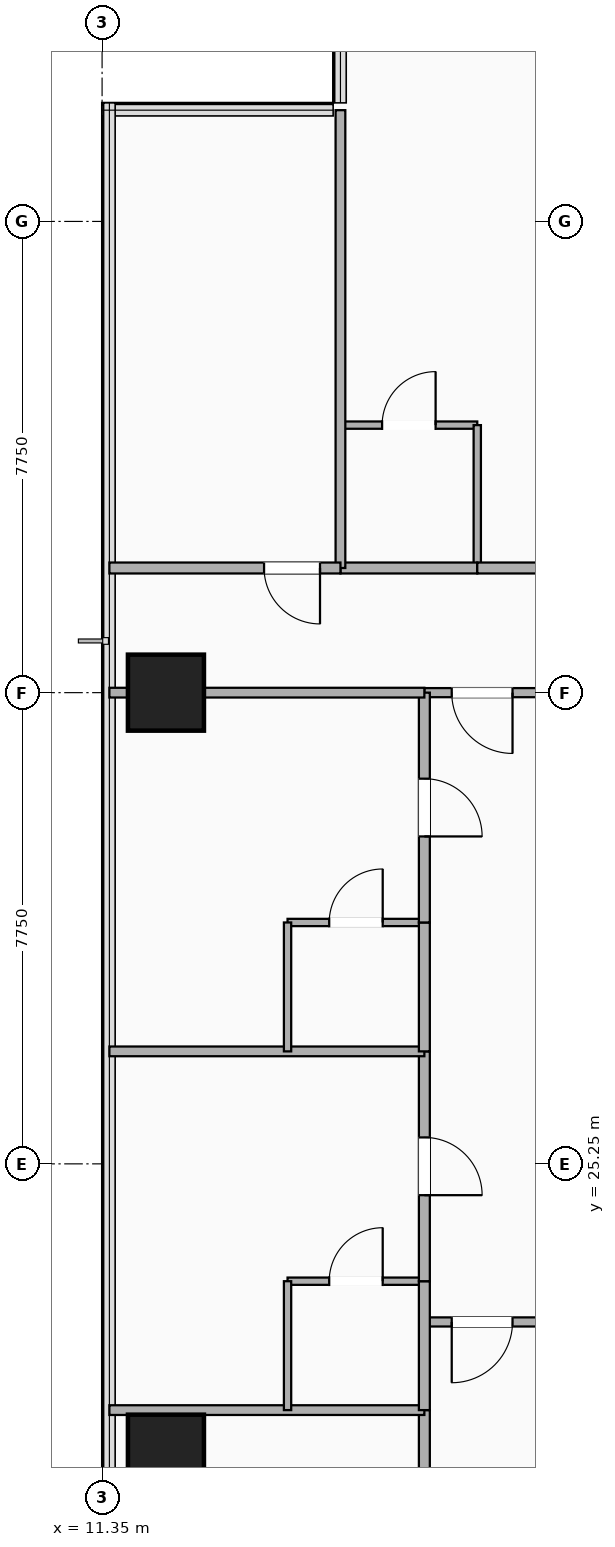
"""IFC4 building model, lengths in metres.
Left out: names, types, materials, properties, quantities, classifications, styles, units other than length and angle.
Written with IfcOpenShell. Run it as: python <this file> out.ifc"""

import sys

from ifc_helpers import new_model, si_unit, direction, frame, frame_2d, origin, origin_2d, place, context, subcontext, project, spatial, rectangle, extrude, element, fill, save


model = new_model("IFC4")
c1 = context("Model", 3, precision=1e-05, world=origin(), true_north=direction((0.0, 1.0)))
c2 = subcontext(c1, "Body", "Model", "MODEL_VIEW")
j1 = project(units=[si_unit("LENGTHUNIT", "METRE"), si_unit("PLANEANGLEUNIT", "RADIAN")], contexts=[c1])
p1 = place(None, origin())
s1 = spatial("IfcSite", under=j1, at=p1, CompositionType="ELEMENT")
p2 = place(p1, origin())
s2 = spatial("IfcBuilding", under=s1, at=p2, CompositionType="ELEMENT")
p3 = place(p2, frame((0.0, 0.0, 98.7)))
s3 = spatial("IfcBuildingStorey", under=s2, at=p3, CompositionType="ELEMENT", Elevation=98.7)
for number, where, z_axis, x_axis in (
    (1, (12.4, 20.5, -0.26), (0.0, 0.0, 1.0), (1.0, 0.0, 0.0)),
    (2, (12.4, 33.0, -0.26), (0.0, 0.0, 1.0), (1.0, 0.0, 0.0)),
):
    element("IfcColumn", number, at=place(p3, frame(where, z_axis=z_axis, x_axis=x_axis)), inside=s3, PredefinedType="COLUMN", context=c2, shape_type="SweptSolid", body=[
        extrude(rectangle(XDim=1.25, YDim=1.25, at=origin_2d()), origin(), (0.0, 0.0, 1.0), 3.5),
    ])
p4 = place(p3, frame((16.65, 22.65, 0.0), z_axis=(0.0, 0.0, 1.0), x_axis=(1.0, 0.0, 0.0)))
e3 = element("IfcWall", 3, at=p4, inside=s3, PredefinedType="PARTITIONING", context=c2, shape_type="SweptSolid", body=[
    extrude(rectangle(XDim=2.0, YDim=0.15, at=frame_2d((1.0, 0.0))), origin(), (0.0, 0.0, 1.0), 3.24),
])
p5 = place(p4, frame((0.45, 0.0, 0.0)))
e4 = element("IfcOpeningElement", 4, at=p5, cuts=e3, PredefinedType="OPENING", context=c2, shape_type="SweptSolid", body=[
    extrude(rectangle(XDim=1.0, YDim=2.15, at=frame_2d((0.5, 1.075))), frame((0.0, 0.085, 0.0), z_axis=(0.0, -1.0, 0.0), x_axis=(1.0, 0.0, 0.0)), (0.0, 0.0, 1.0), 0.17),
])
p6 = place(p3, frame((16.65, 33.0, 0.0), z_axis=(0.0, 0.0, 1.0), x_axis=(1.0, 0.0, 0.0)))
e5 = element("IfcWall", 5, at=p6, inside=s3, PredefinedType="PARTITIONING", context=c2, shape_type="SweptSolid", body=[
    extrude(rectangle(XDim=2.0, YDim=0.15, at=frame_2d((1.0, 0.0))), origin(), (0.0, 0.0, 1.0), 2.313),
])
p7 = place(p6, frame((0.45, 0.0, 0.0)))
e6 = element("IfcOpeningElement", 6, at=p7, cuts=e5, PredefinedType="OPENING", context=c2, shape_type="SweptSolid", body=[
    extrude(rectangle(XDim=1.0, YDim=2.15, at=frame_2d((0.5, 1.075))), frame((0.0, 0.085, 0.0), z_axis=(0.0, -1.0, 0.0), x_axis=(1.0, 0.0, 0.0)), (0.0, 0.0, 1.0), 0.17),
])
p8 = place(p3, frame((15.27, 37.4, 0.0), z_axis=(0.0, 0.0, 1.0), x_axis=(1.0, 0.0, 0.0)))
e7 = element("IfcWall", 7, at=p8, inside=s3, PredefinedType="PARTITIONING", context=c2, shape_type="SweptSolid", body=[
    extrude(rectangle(XDim=2.25, YDim=0.12, at=frame_2d((1.125, 0.0))), origin(), (0.0, 0.0, 1.0), 3.24),
])
p9 = place(p8, frame((1.565, 0.0, 0.0), z_axis=(0.0, 0.0, 1.0), x_axis=(-1.0, 0.0, 0.0)))
e8 = element("IfcOpeningElement", 8, at=p9, cuts=e7, PredefinedType="OPENING", context=c2, shape_type="SweptSolid", body=[
    extrude(rectangle(XDim=0.88, YDim=2.08, at=frame_2d((0.44, 1.04))), frame((0.0, 0.07, 0.0), z_axis=(0.0, -1.0, 0.0), x_axis=(1.0, 0.0, 0.0)), (0.0, 0.0, 1.0), 0.14),
])
p10 = place(p3, frame((17.52, 35.05, 0.0), z_axis=(0.0, 0.0, 1.0), x_axis=(0.0, 1.0, 0.0)))
e9 = element("IfcWall", 9, at=p10, inside=s3, PredefinedType="PARTITIONING", context=c2, shape_type="SweptSolid", body=[
    extrude(rectangle(XDim=2.35, YDim=0.12, at=frame_2d((1.175, 0.0))), origin(), (0.0, 0.0, 1.0), 3.24),
])
p11 = place(p3, frame((15.27, 35.05, 0.0), z_axis=(0.0, 0.0, 1.0), x_axis=(1.0, 0.0, 0.0)))
e10 = element("IfcWall", 10, at=p11, inside=s3, PredefinedType="PARTITIONING", context=c2, shape_type="SweptSolid", body=[
    extrude(rectangle(XDim=2.25, YDim=0.18, at=frame_2d((1.125, 0.0))), origin(), (0.0, 0.0, 1.0), 3.24),
])
p12 = place(p3, frame((17.52, 35.05, 0.0), z_axis=(0.0, 0.0, 1.0), x_axis=(1.0, 0.0, 0.0)))
e11 = element("IfcWall", 11, at=p12, inside=s3, PredefinedType="PARTITIONING", context=c2, shape_type="SweptSolid", body=[
    extrude(rectangle(XDim=7.581, YDim=0.18, at=frame_2d((3.79, 0.0))), origin(), (0.0, 0.0, 1.0), 2.313),
])
p13 = place(p12, frame((3.315, 0.0, 0.0)))
e12 = element("IfcOpeningElement", 12, at=p13, cuts=e11, PredefinedType="OPENING", context=c2, shape_type="SweptSolid", body=[
    extrude(rectangle(XDim=0.95, YDim=2.15, at=frame_2d((0.475, 1.075))), frame((0.0, 0.1, 0.0), z_axis=(0.0, -1.0, 0.0), x_axis=(1.0, 0.0, 0.0)), (0.0, 0.0, 1.0), 0.2),
])
p14 = place(p3, frame((15.27, 35.05, 0.0), z_axis=(0.0, 0.0, 1.0), x_axis=(0.0, 1.0, 0.0)))
e13 = element("IfcWall", 13, at=p14, inside=s3, PredefinedType="PARTITIONING", context=c2, shape_type="SweptSolid", body=[
    extrude(rectangle(XDim=7.53, YDim=0.16, at=frame_2d((3.765, 0.0))), origin(), (0.0, 0.0, 1.0), 3.24),
])
p15 = place(p3, frame((16.65, 17.42, 0.0), z_axis=(0.0, 0.0, 1.0), x_axis=(0.0, 1.0, 0.0)))
e14 = element("IfcWall", 14, at=p15, inside=s3, PredefinedType="PARTITIONING", context=c2, shape_type="SweptSolid", body=[
    extrude(rectangle(XDim=3.78, YDim=0.18, at=frame_2d((1.89, 0.0))), origin(), (0.0, 0.0, 1.0), 2.313),
])
p16 = place(p15, frame((1.415, 0.0, 0.0)))
e15 = element("IfcOpeningElement", 15, at=p16, cuts=e14, PredefinedType="OPENING", context=c2, shape_type="SweptSolid", body=[
    extrude(rectangle(XDim=0.95, YDim=2.15, at=frame_2d((0.475, 1.075))), frame((0.0, 0.1, 0.0), z_axis=(0.0, -1.0, 0.0), x_axis=(1.0, 0.0, 0.0)), (0.0, 0.0, 1.0), 0.2),
])
p17 = place(p3, frame((11.47, 21.2, 0.0), z_axis=(0.0, 0.0, 1.0), x_axis=(1.0, 0.0, 0.0)))
e16 = element("IfcWall", 16, at=p17, inside=s3, PredefinedType="PARTITIONING", context=c2, shape_type="SweptSolid", body=[
    extrude(rectangle(XDim=5.18, YDim=0.16, at=frame_2d((2.59, 0.0))), origin(), (0.0, 0.0, 1.0), 2.603),
])
p18 = place(p3, frame((14.4, 23.32, 0.0), z_axis=(0.0, 0.0, 1.0), x_axis=(1.0, 0.0, 0.0)))
e17 = element("IfcWall", 17, at=p18, inside=s3, PredefinedType="PARTITIONING", context=c2, shape_type="SweptSolid", body=[
    extrude(rectangle(XDim=2.25, YDim=0.12, at=frame_2d((1.125, 0.0))), origin(), (0.0, 0.0, 1.0), 3.24),
])
p19 = place(p18, frame((1.565, 0.0, 0.0), z_axis=(0.0, 0.0, 1.0), x_axis=(-1.0, 0.0, 0.0)))
e18 = element("IfcOpeningElement", 18, at=p19, cuts=e17, PredefinedType="OPENING", context=c2, shape_type="SweptSolid", body=[
    extrude(rectangle(XDim=0.88, YDim=2.08, at=frame_2d((0.44, 1.04))), frame((0.0, 0.07, 0.0), z_axis=(0.0, -1.0, 0.0), x_axis=(1.0, 0.0, 0.0)), (0.0, 0.0, 1.0), 0.14),
])
p20 = place(p3, frame((14.4, 21.2, 0.0), z_axis=(0.0, 0.0, 1.0), x_axis=(0.0, 1.0, 0.0)))
e19 = element("IfcWall", 19, at=p20, inside=s3, PredefinedType="PARTITIONING", context=c2, shape_type="SweptSolid", body=[
    extrude(rectangle(XDim=2.12, YDim=0.12, at=frame_2d((1.06, 0.0))), origin(), (0.0, 0.0, 1.0), 3.24),
])
p21 = place(p3, frame((16.65, 21.2, 0.0), z_axis=(0.0, 0.0, 1.0), x_axis=(0.0, 1.0, 0.0)))
e20 = element("IfcWall", 20, at=p21, inside=s3, PredefinedType="PARTITIONING", context=c2, shape_type="SweptSolid", body=[
    extrude(rectangle(XDim=2.12, YDim=0.18, at=frame_2d((1.06, 0.0))), origin(), (0.0, 0.0, 1.0), 3.24),
])
p22 = place(p3, frame((16.65, 23.32, 0.0), z_axis=(0.0, 0.0, 1.0), x_axis=(0.0, 1.0, 0.0)))
e21 = element("IfcWall", 21, at=p22, inside=s3, PredefinedType="PARTITIONING", context=c2, shape_type="SweptSolid", body=[
    extrude(rectangle(XDim=3.78, YDim=0.18, at=frame_2d((1.89, 0.0))), origin(), (0.0, 0.0, 1.0), 2.818),
])
p23 = place(p22, frame((1.415, 0.0, 0.0)))
e22 = element("IfcOpeningElement", 22, at=p23, cuts=e21, PredefinedType="OPENING", context=c2, shape_type="SweptSolid", body=[
    extrude(rectangle(XDim=0.95, YDim=2.15, at=frame_2d((0.475, 1.075))), frame((0.0, 0.1, 0.0), z_axis=(0.0, -1.0, 0.0), x_axis=(1.0, 0.0, 0.0)), (0.0, 0.0, 1.0), 0.2),
])
p24 = place(p3, frame((11.47, 27.1, 0.0), z_axis=(0.0, 0.0, 1.0), x_axis=(1.0, 0.0, 0.0)))
e23 = element("IfcWall", 23, at=p24, inside=s3, PredefinedType="PARTITIONING", context=c2, shape_type="SweptSolid", body=[
    extrude(rectangle(XDim=5.18, YDim=0.16, at=frame_2d((2.59, 0.0))), origin(), (0.0, 0.0, 1.0), 2.603),
])
p25 = place(p3, frame((14.4, 29.22, 0.0), z_axis=(0.0, 0.0, 1.0), x_axis=(1.0, 0.0, 0.0)))
e24 = element("IfcWall", 24, at=p25, inside=s3, PredefinedType="PARTITIONING", context=c2, shape_type="SweptSolid", body=[
    extrude(rectangle(XDim=2.25, YDim=0.12, at=frame_2d((1.125, 0.0))), origin(), (0.0, 0.0, 1.0), 3.24),
])
p26 = place(p25, frame((1.565, 0.0, 0.0), z_axis=(0.0, 0.0, 1.0), x_axis=(-1.0, 0.0, 0.0)))
e25 = element("IfcOpeningElement", 25, at=p26, cuts=e24, PredefinedType="OPENING", context=c2, shape_type="SweptSolid", body=[
    extrude(rectangle(XDim=0.88, YDim=2.08, at=frame_2d((0.44, 1.04))), frame((0.0, 0.07, 0.0), z_axis=(0.0, -1.0, 0.0), x_axis=(1.0, 0.0, 0.0)), (0.0, 0.0, 1.0), 0.14),
])
p27 = place(p3, frame((14.4, 27.1, 0.0), z_axis=(0.0, 0.0, 1.0), x_axis=(0.0, 1.0, 0.0)))
e26 = element("IfcWall", 26, at=p27, inside=s3, PredefinedType="PARTITIONING", context=c2, shape_type="SweptSolid", body=[
    extrude(rectangle(XDim=2.12, YDim=0.12, at=frame_2d((1.06, 0.0))), origin(), (0.0, 0.0, 1.0), 2.818),
])
p28 = place(p3, frame((16.65, 27.1, 0.0), z_axis=(0.0, 0.0, 1.0), x_axis=(0.0, 1.0, 0.0)))
e27 = element("IfcWall", 27, at=p28, inside=s3, PredefinedType="PARTITIONING", context=c2, shape_type="SweptSolid", body=[
    extrude(rectangle(XDim=2.12, YDim=0.18, at=frame_2d((1.06, 0.0))), origin(), (0.0, 0.0, 1.0), 2.818),
])
p29 = place(p3, frame((16.65, 29.22, 0.0), z_axis=(0.0, 0.0, 1.0), x_axis=(0.0, 1.0, 0.0)))
e28 = element("IfcWall", 28, at=p29, inside=s3, PredefinedType="PARTITIONING", context=c2, shape_type="SweptSolid", body=[
    extrude(rectangle(XDim=3.78, YDim=0.18, at=frame_2d((1.89, 0.0))), origin(), (0.0, 0.0, 1.0), 2.313),
])
p30 = place(p29, frame((1.415, 0.0, 0.0)))
e29 = element("IfcOpeningElement", 29, at=p30, cuts=e28, PredefinedType="OPENING", context=c2, shape_type="SweptSolid", body=[
    extrude(rectangle(XDim=0.95, YDim=2.15, at=frame_2d((0.475, 1.075))), frame((0.0, 0.1, 0.0), z_axis=(0.0, -1.0, 0.0), x_axis=(1.0, 0.0, 0.0)), (0.0, 0.0, 1.0), 0.2),
])
p31 = place(p3, frame((11.47, 33.0, 0.0), z_axis=(0.0, 0.0, 1.0), x_axis=(1.0, 0.0, 0.0)))
e30 = element("IfcWall", 30, at=p31, inside=s3, PredefinedType="PARTITIONING", context=c2, shape_type="SweptSolid", body=[
    extrude(rectangle(XDim=5.18, YDim=0.16, at=frame_2d((2.59, 0.0))), origin(), (0.0, 0.0, 1.0), 2.313),
])
p32 = place(p3, frame((11.47, 35.05, 0.0), z_axis=(0.0, 0.0, 1.0), x_axis=(1.0, 0.0, 0.0)))
e31 = element("IfcWall", 31, at=p32, inside=s3, PredefinedType="PARTITIONING", context=c2, shape_type="SweptSolid", body=[
    extrude(rectangle(XDim=3.8, YDim=0.18, at=frame_2d((1.9, 0.0))), origin(), (0.0, 0.0, 1.0), 3.24),
])
p33 = place(p32, frame((2.544, 0.0, 0.0)))
e32 = element("IfcOpeningElement", 32, at=p33, cuts=e31, PredefinedType="OPENING", context=c2, shape_type="SweptSolid", body=[
    extrude(rectangle(XDim=0.92, YDim=2.08, at=frame_2d((0.46, 1.04))), frame((0.0, 0.1, 0.0), z_axis=(0.0, -1.0, 0.0), x_axis=(1.0, 0.0, 0.0)), (0.0, 0.0, 1.0), 0.2),
])
p34 = place(p5, origin())
e33 = element("IfcDoor", 33, at=p34, inside=s3, OperationType="SINGLE_SWING_LEFT", PredefinedType="DOOR", context=c2, shape_type="SweptSolid", body=[
    extrude(rectangle(XDim=1.0, YDim=2.15, at=frame_2d((0.5, 1.075))), frame((0.0, 0.025, 0.0), z_axis=(0.0, -1.0, 0.0), x_axis=(1.0, 0.0, 0.0)), (0.0, 0.0, 1.0), 0.05),
])
fill(e4, e33)
p35 = place(p7, origin())
e34 = element("IfcDoor", 34, at=p35, inside=s3, OperationType="SINGLE_SWING_RIGHT", PredefinedType="DOOR", context=c2, shape_type="SweptSolid", body=[
    extrude(rectangle(XDim=1.0, YDim=2.15, at=frame_2d((0.5, 1.075))), frame((0.0, 0.025, 0.0), z_axis=(0.0, -1.0, 0.0), x_axis=(1.0, 0.0, 0.0)), (0.0, 0.0, 1.0), 0.05),
])
fill(e6, e34)
p36 = place(p9, origin())
e35 = element("IfcDoor", 35, at=p36, inside=s3, OperationType="SINGLE_SWING_RIGHT", PredefinedType="DOOR", context=c2, shape_type="SweptSolid", body=[
    extrude(rectangle(XDim=0.88, YDim=2.08, at=frame_2d((0.44, 1.04))), frame((0.0, 0.025, 0.0), z_axis=(0.0, -1.0, 0.0), x_axis=(1.0, 0.0, 0.0)), (0.0, 0.0, 1.0), 0.05),
])
fill(e8, e35)
p37 = place(p19, origin())
e36 = element("IfcDoor", 36, at=p37, inside=s3, OperationType="SINGLE_SWING_RIGHT", PredefinedType="DOOR", context=c2, shape_type="SweptSolid", body=[
    extrude(rectangle(XDim=0.88, YDim=2.08, at=frame_2d((0.44, 1.04))), frame((0.0, 0.025, 0.0), z_axis=(0.0, -1.0, 0.0), x_axis=(1.0, 0.0, 0.0)), (0.0, 0.0, 1.0), 0.05),
])
fill(e18, e36)
p38 = place(p23, origin())
e37 = element("IfcDoor", 37, at=p38, inside=s3, OperationType="SINGLE_SWING_LEFT", PredefinedType="DOOR", context=c2, shape_type="SweptSolid", body=[
    extrude(rectangle(XDim=0.95, YDim=2.15, at=frame_2d((0.475, 1.075))), frame((0.0, 0.025, 0.0), z_axis=(0.0, -1.0, 0.0), x_axis=(1.0, 0.0, 0.0)), (0.0, 0.0, 1.0), 0.05),
])
fill(e22, e37)
p39 = place(p26, origin())
e38 = element("IfcDoor", 38, at=p39, inside=s3, OperationType="SINGLE_SWING_RIGHT", PredefinedType="DOOR", context=c2, shape_type="SweptSolid", body=[
    extrude(rectangle(XDim=0.88, YDim=2.08, at=frame_2d((0.44, 1.04))), frame((0.0, 0.025, 0.0), z_axis=(0.0, -1.0, 0.0), x_axis=(1.0, 0.0, 0.0)), (0.0, 0.0, 1.0), 0.05),
])
fill(e25, e38)
p40 = place(p30, origin())
e39 = element("IfcDoor", 39, at=p40, inside=s3, OperationType="SINGLE_SWING_LEFT", PredefinedType="DOOR", context=c2, shape_type="SweptSolid", body=[
    extrude(rectangle(XDim=0.95, YDim=2.15, at=frame_2d((0.475, 1.075))), frame((0.0, 0.025, 0.0), z_axis=(0.0, -1.0, 0.0), x_axis=(1.0, 0.0, 0.0)), (0.0, 0.0, 1.0), 0.05),
])
fill(e29, e39)
p41 = place(p33, origin())
e40 = element("IfcDoor", 40, at=p41, inside=s3, OperationType="SINGLE_SWING_RIGHT", PredefinedType="DOOR", context=c2, shape_type="SweptSolid", body=[
    extrude(rectangle(XDim=0.92, YDim=2.08, at=frame_2d((0.46, 1.04))), frame((0.0, 0.025, 0.0), z_axis=(0.0, -1.0, 0.0), x_axis=(1.0, 0.0, 0.0)), (0.0, 0.0, 1.0), 0.05),
])
fill(e32, e40)
save(model, sys.argv[1])
